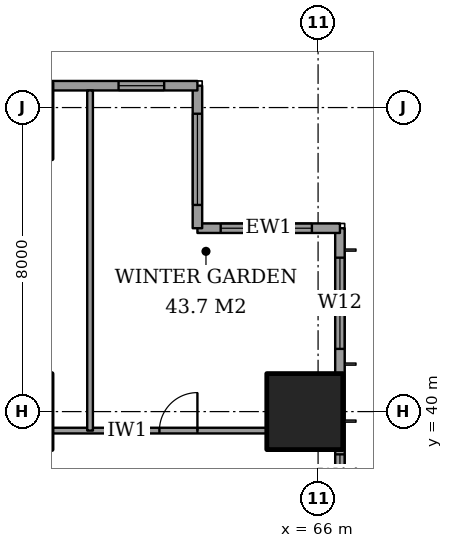
"""IFC4 building model, lengths in metres.
Left out: names, types, materials, properties, quantities, classifications, styles, units other than length and angle.
Written with IfcOpenShell. Run it as: python <this file> out.ifc"""

import sys

from ifc_helpers import new_model, si_unit, direction, frame, frame_2d, origin, origin_2d, place, context, subcontext, project, spatial, rectangle, extrude, element, fill, save


model = new_model("IFC4")
c1 = context("Model", 3, precision=1e-05, world=origin(), true_north=direction((0.0, 1.0)))
c2 = subcontext(c1, "Body", "Model", "MODEL_VIEW")
j1 = project(units=[si_unit("LENGTHUNIT", "METRE"), si_unit("PLANEANGLEUNIT", "RADIAN")], contexts=[c1])
p1 = place(None, origin())
s1 = spatial("IfcSite", under=j1, at=p1, CompositionType="ELEMENT")
p2 = place(p1, origin())
s2 = spatial("IfcBuilding", under=s1, at=p2, CompositionType="ELEMENT")
p3 = place(p2, frame((0.0, 0.0, 121.4)))
s3 = spatial("IfcBuildingStorey", under=s2, at=p3, CompositionType="ELEMENT", Elevation=121.4)
p4 = place(p3, frame((65.65, 40.0, 0.0), z_axis=(0.0, 0.0, 1.0), x_axis=(1.0, 0.0, 0.0)))
e1 = element("IfcColumn", 1, at=p4, inside=s3, PredefinedType="COLUMN", context=c2, shape_type="SweptSolid", body=[
    extrude(rectangle(XDim=2.0, YDim=2.0, at=origin_2d()), origin(), (0.0, 0.0, 1.0), 3.6),
])
p5 = place(p3, frame((66.575, 3.175, 0.0), z_axis=(0.0, 0.0, 1.0), x_axis=(0.0, 1.0, 0.0)))
e2 = element("IfcWall", 2, at=p5, inside=s3, PredefinedType="SOLIDWALL", context=c2, shape_type="SweptSolid", body=[
    extrude(rectangle(XDim=41.65, YDim=0.25, at=frame_2d((20.825, 0.0))), origin(), (0.0, 0.0, 1.0), 3.6),
])
p6 = place(p5, frame((0.775, 0.0, 0.4)))
e3 = element("IfcOpeningElement", 3, at=p6, cuts=e2, PredefinedType="OPENING", context=c2, shape_type="SweptSolid", body=[
    extrude(rectangle(XDim=2.4, YDim=2.2, at=frame_2d((1.2, 1.1))), frame((0.0, 0.135, 0.0), z_axis=(0.0, -1.0, 0.0), x_axis=(1.0, 0.0, 0.0)), (0.0, 0.0, 1.0), 0.27),
])
p7 = place(p5, frame((6.4, 0.0, 0.4)))
e4 = element("IfcOpeningElement", 4, at=p7, cuts=e2, PredefinedType="OPENING", context=c2, shape_type="SweptSolid", body=[
    extrude(rectangle(XDim=1.2, YDim=2.2, at=frame_2d((0.6, 1.1))), frame((0.0, 0.135, 0.0), z_axis=(0.0, -1.0, 0.0), x_axis=(1.0, 0.0, 0.0)), (0.0, 0.0, 1.0), 0.27),
])
p8 = place(p5, frame((8.475, 0.0, 0.4)))
e5 = element("IfcOpeningElement", 5, at=p8, cuts=e2, PredefinedType="OPENING", context=c2, shape_type="SweptSolid", body=[
    extrude(rectangle(XDim=2.4, YDim=2.2, at=frame_2d((1.2, 1.1))), frame((0.0, 0.135, 0.0), z_axis=(0.0, -1.0, 0.0), x_axis=(1.0, 0.0, 0.0)), (0.0, 0.0, 1.0), 0.27),
])
p9 = place(p5, frame((15.775, 0.0, 0.4)))
e6 = element("IfcOpeningElement", 6, at=p9, cuts=e2, PredefinedType="OPENING", context=c2, shape_type="SweptSolid", body=[
    extrude(rectangle(XDim=2.4, YDim=2.2, at=frame_2d((1.2, 1.1))), frame((0.0, 0.135, 0.0), z_axis=(0.0, -1.0, 0.0), x_axis=(1.0, 0.0, 0.0)), (0.0, 0.0, 1.0), 0.27),
])
p10 = place(p5, frame((23.475, 0.0, 0.4)))
e7 = element("IfcOpeningElement", 7, at=p10, cuts=e2, PredefinedType="OPENING", context=c2, shape_type="SweptSolid", body=[
    extrude(rectangle(XDim=2.4, YDim=2.2, at=frame_2d((1.2, 1.1))), frame((0.0, 0.135, 0.0), z_axis=(0.0, -1.0, 0.0), x_axis=(1.0, 0.0, 0.0)), (0.0, 0.0, 1.0), 0.27),
])
p11 = place(p5, frame((30.975, 0.0, 0.4)))
e8 = element("IfcOpeningElement", 8, at=p11, cuts=e2, PredefinedType="OPENING", context=c2, shape_type="SweptSolid", body=[
    extrude(rectangle(XDim=2.4, YDim=2.2, at=frame_2d((1.2, 1.1))), frame((0.0, 0.135, 0.0), z_axis=(0.0, -1.0, 0.0), x_axis=(1.0, 0.0, 0.0)), (0.0, 0.0, 1.0), 0.27),
])
p12 = place(p5, frame((34.5, 0.0, 0.4)))
e9 = element("IfcOpeningElement", 9, at=p12, cuts=e2, PredefinedType="OPENING", context=c2, shape_type="SweptSolid", body=[
    extrude(rectangle(XDim=1.2, YDim=2.2, at=frame_2d((0.6, 1.1))), frame((0.0, 0.135, 0.0), z_axis=(0.0, -1.0, 0.0), x_axis=(1.0, 0.0, 0.0)), (0.0, 0.0, 1.0), 0.27),
])
p13 = place(p5, frame((38.475, 0.0, 0.4)))
e10 = element("IfcOpeningElement", 10, at=p13, cuts=e2, PredefinedType="OPENING", context=c2, shape_type="SweptSolid", body=[
    extrude(rectangle(XDim=2.4, YDim=2.2, at=frame_2d((1.2, 1.1))), frame((0.0, 0.135, 0.0), z_axis=(0.0, -1.0, 0.0), x_axis=(1.0, 0.0, 0.0)), (0.0, 0.0, 1.0), 0.27),
])
p14 = place(p3, frame((66.575, 44.825, 0.0), z_axis=(0.0, 0.0, 1.0), x_axis=(-1.0, 0.0, 0.0)))
e11 = element("IfcWall", 11, at=p14, inside=s3, PredefinedType="SOLIDWALL", context=c2, shape_type="SweptSolid", body=[
    extrude(rectangle(XDim=3.75, YDim=0.25, at=frame_2d((1.875, 0.0))), origin(), (0.0, 0.0, 1.0), 3.6),
])
p15 = place(p14, frame((0.738, 0.0, 0.4)))
e12 = element("IfcOpeningElement", 12, at=p15, cuts=e11, PredefinedType="OPENING", context=c2, shape_type="SweptSolid", body=[
    extrude(rectangle(XDim=2.4, YDim=2.2, at=frame_2d((1.2, 1.1))), frame((0.0, 0.135, 0.0), z_axis=(0.0, -1.0, 0.0), x_axis=(1.0, 0.0, 0.0)), (0.0, 0.0, 1.0), 0.27),
])
p16 = place(p3, frame((62.825, 44.825, 0.0), z_axis=(0.0, 0.0, 1.0), x_axis=(0.0, 1.0, 0.0)))
e13 = element("IfcWall", 13, at=p16, inside=s3, PredefinedType="SOLIDWALL", context=c2, shape_type="SweptSolid", body=[
    extrude(rectangle(XDim=3.75, YDim=0.25, at=frame_2d((1.875, 0.0))), origin(), (0.0, 0.0, 1.0), 3.6),
])
p17 = place(p16, frame((0.613, 0.0, 0.4)))
e14 = element("IfcOpeningElement", 14, at=p17, cuts=e13, PredefinedType="OPENING", context=c2, shape_type="SweptSolid", body=[
    extrude(rectangle(XDim=2.4, YDim=2.2, at=frame_2d((1.2, 1.1))), frame((0.0, 0.135, 0.0), z_axis=(0.0, -1.0, 0.0), x_axis=(1.0, 0.0, 0.0)), (0.0, 0.0, 1.0), 0.27),
])
p18 = place(p3, frame((62.825, 48.575, 0.0), z_axis=(0.0, 0.0, 1.0), x_axis=(-1.0, 0.0, 0.0)))
e15 = element("IfcWall", 15, at=p18, inside=s3, PredefinedType="SOLIDWALL", context=c2, shape_type="SweptSolid", body=[
    extrude(rectangle(XDim=21.4, YDim=0.25, at=frame_2d((10.7, 0.0))), origin(), (0.0, 0.0, 1.0), 3.6),
])
p19 = place(p18, frame((0.875, 0.0, 0.4)))
e16 = element("IfcOpeningElement", 16, at=p19, cuts=e15, PredefinedType="OPENING", context=c2, shape_type="SweptSolid", body=[
    extrude(rectangle(XDim=1.2, YDim=2.2, at=frame_2d((0.6, 1.1))), frame((0.0, 0.135, 0.0), z_axis=(0.0, -1.0, 0.0), x_axis=(1.0, 0.0, 0.0)), (0.0, 0.0, 1.0), 0.27),
])
p20 = place(p18, frame((6.525, 0.0, 0.4)))
e17 = element("IfcOpeningElement", 17, at=p20, cuts=e15, PredefinedType="OPENING", context=c2, shape_type="SweptSolid", body=[
    extrude(rectangle(XDim=2.4, YDim=2.2, at=frame_2d((1.2, 1.1))), frame((0.0, 0.135, 0.0), z_axis=(0.0, -1.0, 0.0), x_axis=(1.0, 0.0, 0.0)), (0.0, 0.0, 1.0), 0.27),
])
p21 = place(p18, frame((9.975, 0.0, 0.4)))
e18 = element("IfcOpeningElement", 18, at=p21, cuts=e15, PredefinedType="OPENING", context=c2, shape_type="SweptSolid", body=[
    extrude(rectangle(XDim=1.2, YDim=2.2, at=frame_2d((0.6, 1.1))), frame((0.0, 0.135, 0.0), z_axis=(0.0, -1.0, 0.0), x_axis=(1.0, 0.0, 0.0)), (0.0, 0.0, 1.0), 0.27),
])
p22 = place(p18, frame((14.175, 0.0, 0.4)))
e19 = element("IfcOpeningElement", 19, at=p22, cuts=e15, PredefinedType="OPENING", context=c2, shape_type="SweptSolid", body=[
    extrude(rectangle(XDim=1.2, YDim=2.2, at=frame_2d((0.6, 1.1))), frame((0.0, 0.135, 0.0), z_axis=(0.0, -1.0, 0.0), x_axis=(1.0, 0.0, 0.0)), (0.0, 0.0, 1.0), 0.27),
])
p23 = place(p18, frame((16.4, 0.0, 0.4)))
e20 = element("IfcOpeningElement", 20, at=p23, cuts=e15, PredefinedType="OPENING", context=c2, shape_type="SweptSolid", body=[
    extrude(rectangle(XDim=2.4, YDim=2.2, at=frame_2d((1.2, 1.1))), frame((0.0, 0.135, 0.0), z_axis=(0.0, -1.0, 0.0), x_axis=(1.0, 0.0, 0.0)), (0.0, 0.0, 1.0), 0.27),
])
p24 = place(p3, frame((59.0, 39.5, 0.0), z_axis=(0.0, 0.0, 1.0), x_axis=(1.0, 0.0, 0.0)))
e21 = element("IfcWall", 21, at=p24, inside=s3, PredefinedType="PARTITIONING", context=c2, shape_type="SweptSolid", body=[
    extrude(rectangle(XDim=5.65, YDim=0.15, at=frame_2d((2.825, 0.0))), origin(), (0.0, 0.0, 1.0), 3.35),
])
p25 = place(p24, frame((2.825, 0.0, 0.0)))
e22 = element("IfcOpeningElement", 22, at=p25, cuts=e21, PredefinedType="OPENING", context=c2, shape_type="SweptSolid", body=[
    extrude(rectangle(XDim=1.0, YDim=2.1, at=frame_2d((0.5, 1.05))), frame((0.0, 0.085, 0.0), z_axis=(0.0, -1.0, 0.0), x_axis=(1.0, 0.0, 0.0)), (0.0, 0.0, 1.0), 0.17),
])
p26 = place(p3, frame((60.0, 39.5, 0.0), z_axis=(0.0, 0.0, 1.0), x_axis=(0.0, 1.0, 0.0)))
e23 = element("IfcWall", 23, at=p26, inside=s3, PredefinedType="PARTITIONING", context=c2, shape_type="SweptSolid", body=[
    extrude(rectangle(XDim=8.95, YDim=0.15, at=frame_2d((4.475, 0.0))), origin(), (0.0, 0.0, 1.0), 3.35),
])
p27 = place(p12, origin())
e24 = element("IfcWindow", 24, at=p27, inside=s3, PartitioningType="SINGLE_PANEL", PredefinedType="WINDOW", context=c2, shape_type="SweptSolid", body=[
    extrude(rectangle(XDim=1.2, YDim=2.2, at=frame_2d((0.6, 1.1))), frame((0.0, 0.03, 0.0), z_axis=(0.0, -1.0, 0.0), x_axis=(1.0, 0.0, 0.0)), (0.0, 0.0, 1.0), 0.06),
])
fill(e9, e24)
p28 = place(p13, origin())
e25 = element("IfcWindow", 25, at=p28, inside=s3, PartitioningType="SINGLE_PANEL", PredefinedType="WINDOW", context=c2, shape_type="SweptSolid", body=[
    extrude(rectangle(XDim=2.4, YDim=2.2, at=frame_2d((1.2, 1.1))), frame((0.0, 0.03, 0.0), z_axis=(0.0, -1.0, 0.0), x_axis=(1.0, 0.0, 0.0)), (0.0, 0.0, 1.0), 0.06),
])
fill(e10, e25)
p29 = place(p15, origin())
e26 = element("IfcWindow", 26, at=p29, inside=s3, PartitioningType="SINGLE_PANEL", PredefinedType="WINDOW", context=c2, shape_type="SweptSolid", body=[
    extrude(rectangle(XDim=2.4, YDim=2.2, at=frame_2d((1.2, 1.1))), frame((0.0, 0.03, 0.0), z_axis=(0.0, -1.0, 0.0), x_axis=(1.0, 0.0, 0.0)), (0.0, 0.0, 1.0), 0.06),
])
fill(e12, e26)
p30 = place(p17, origin())
e27 = element("IfcWindow", 27, at=p30, inside=s3, PartitioningType="SINGLE_PANEL", PredefinedType="WINDOW", context=c2, shape_type="SweptSolid", body=[
    extrude(rectangle(XDim=2.4, YDim=2.2, at=frame_2d((1.2, 1.1))), frame((0.0, 0.03, 0.0), z_axis=(0.0, -1.0, 0.0), x_axis=(1.0, 0.0, 0.0)), (0.0, 0.0, 1.0), 0.06),
])
fill(e14, e27)
p31 = place(p19, origin())
e28 = element("IfcWindow", 28, at=p31, inside=s3, PartitioningType="SINGLE_PANEL", PredefinedType="WINDOW", context=c2, shape_type="SweptSolid", body=[
    extrude(rectangle(XDim=1.2, YDim=2.2, at=frame_2d((0.6, 1.1))), frame((0.0, 0.03, 0.0), z_axis=(0.0, -1.0, 0.0), x_axis=(1.0, 0.0, 0.0)), (0.0, 0.0, 1.0), 0.06),
])
fill(e16, e28)
p32 = place(p25, origin())
e29 = element("IfcDoor", 29, at=p32, inside=s3, OperationType="SINGLE_SWING_LEFT", PredefinedType="DOOR", context=c2, shape_type="SweptSolid", body=[
    extrude(rectangle(XDim=1.0, YDim=2.1, at=frame_2d((0.5, 1.05))), frame((0.0, 0.025, 0.0), z_axis=(0.0, -1.0, 0.0), x_axis=(1.0, 0.0, 0.0)), (0.0, 0.0, 1.0), 0.05),
])
fill(e22, e29)
save(model, sys.argv[1])
